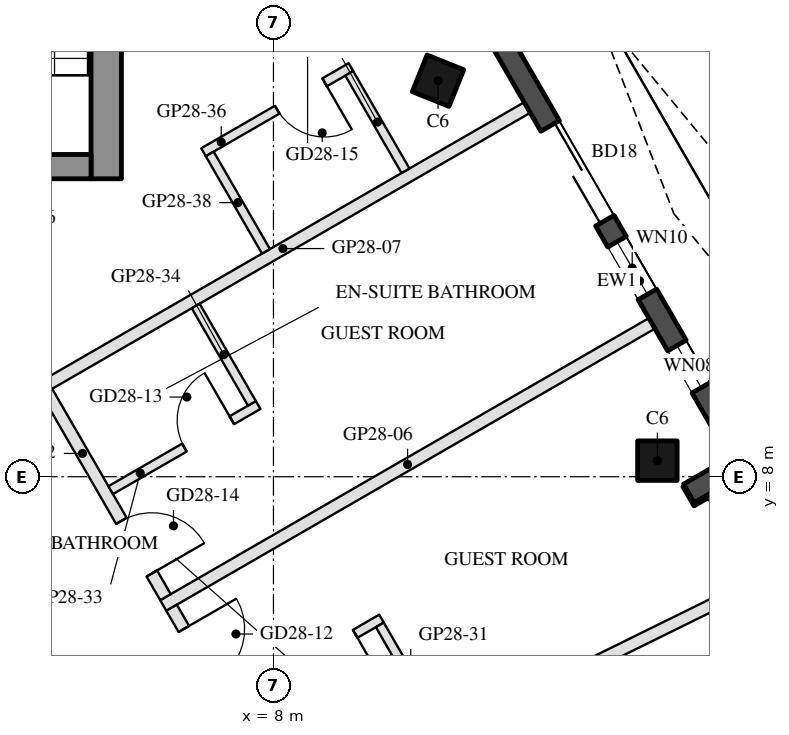
"""IFC4 building model, lengths in metres.
Left out: names, types, materials, properties, quantities, classifications, styles, units other than length and angle.
Written with IfcOpenShell. Run it as: python <this file> out.ifc"""

import sys

from ifc_helpers import new_model, si_unit, direction, frame, frame_2d, origin, origin_2d, place, context, subcontext, project, spatial, rectangle, hollow_rectangle, extrude, boolean, halfspace, element, fill, save


model = new_model("IFC4")
c1 = context("Model", 3, precision=1e-05, world=origin(), true_north=direction((0.0, 1.0)))
c2 = subcontext(c1, "Body", "Model", "MODEL_VIEW")
j1 = project(units=[si_unit("LENGTHUNIT", "METRE"), si_unit("PLANEANGLEUNIT", "RADIAN")], contexts=[c1])
p1 = place(None, origin())
s1 = spatial("IfcSite", under=j1, at=p1, CompositionType="ELEMENT")
p2 = place(p1, origin())
s2 = spatial("IfcBuilding", under=s1, at=p2, CompositionType="ELEMENT")
p3 = place(p2, frame((0.0, 0.0, 287.4)))
s3 = spatial("IfcBuildingStorey", under=s2, at=p3, CompositionType="ELEMENT", Elevation=287.4)
p4 = place(p3, frame((14.314, 8.264, 0.0), z_axis=(-0.13115563542, -0.07578460883, 0.988460870425), x_axis=(-0.500216662803, 0.86590027717, 1.5862574e-05)))
e1 = element("IfcColumn", 1, at=p4, inside=s3, PredefinedType="COLUMN", context=c2, shape_type="SweptSolid", body=[
    boolean("DIFFERENCE", boolean("DIFFERENCE", extrude(hollow_rectangle(XDim=0.65, YDim=0.65, WallThickness=0.03, at=origin_2d()), origin(), (0.0, 0.0, 1.0), 3.743), halfspace(frame((0.0, 0.0, 0.037), z_axis=(0.0, 0.0, 1.0), x_axis=(1.0, 0.0, 0.0)), True)), halfspace(frame((0.0, 0.0, 3.706), z_axis=(0.0, 0.0, 1.0), x_axis=(1.0, 0.0, 0.0)), False)),
])
p5 = place(p3, frame((10.707, 14.513, 0.0), z_axis=(-0.100511564979, -0.128308480942, 0.986627771261), x_axis=(-0.503128985572, 0.862066140583, 0.060853867073)))
e2 = element("IfcColumn", 2, at=p5, inside=s3, PredefinedType="COLUMN", context=c2, shape_type="SweptSolid", body=[
    boolean("DIFFERENCE", boolean("DIFFERENCE", extrude(hollow_rectangle(XDim=0.65, YDim=0.65, WallThickness=0.03, at=origin_2d()), origin(), (0.0, 0.0, 1.0), 3.75), halfspace(frame((0.0, 0.0, 0.04), z_axis=(0.0, 0.0, 1.0), x_axis=(1.0, 0.0, 0.0)), True)), halfspace(frame((0.0, 0.0, 3.711), z_axis=(0.0, 0.0, 1.0), x_axis=(1.0, 0.0, 0.0)), False)),
])
p6 = place(p3, frame((17.913, 2.68, 0.0), z_axis=(0.0, 0.0, 1.0), x_axis=(-0.499985371027, 0.866033849661, 0.0)))
e3 = element("IfcWall", 3, at=p6, inside=s3, PredefinedType="SOLIDWALL", context=c2, shape_type="SweptSolid", body=[
    extrude(rectangle(XDim=6.055, YDim=0.35, at=frame_2d((3.028, 0.0))), origin(), (0.0, 0.0, 1.0), 3.55),
])
p7 = place(p6, frame((4.59, 0.0, 0.0)))
e4 = element("IfcOpeningElement", 4, at=p7, cuts=e3, PredefinedType="OPENING", context=c2, shape_type="SweptSolid", body=[
    extrude(rectangle(XDim=1.1, YDim=2.4, at=frame_2d((0.55, 1.2))), frame((0.0, 0.185, 0.0), z_axis=(0.0, -1.0, 0.0), x_axis=(1.0, 0.0, 0.0)), (0.0, 0.0, 1.0), 0.37),
])
p8 = place(p3, frame((14.833, 7.727, 0.0), z_axis=(0.0, 0.0, 1.0), x_axis=(0.866142280446, 0.499797509021, 0.0)))
e5 = element("IfcWall", 5, at=p8, inside=s3, PredefinedType="SOLIDWALL", context=c2, shape_type="SweptSolid", body=[
    extrude(rectangle(XDim=1.22, YDim=0.35, at=frame_2d((0.61, 0.0))), origin(), (0.0, 0.0, 1.0), 3.55),
])
p9 = place(p3, frame((15.825, 8.097, 0.0), z_axis=(0.0, 0.0, 1.0), x_axis=(-0.500006872736, 0.866021435772, 0.0)))
e6 = element("IfcWall", 6, at=p9, inside=s3, PredefinedType="SOLIDWALL", context=c2, shape_type="SweptSolid", body=[
    extrude(rectangle(XDim=9.015, YDim=0.35, at=frame_2d((4.508, 0.0))), origin(), (0.0, 0.0, 1.0), 3.55),
])
p10 = place(p9, frame((1.579, 0.0, 0.3)))
e7 = element("IfcOpeningElement", 7, at=p10, cuts=e6, PredefinedType="OPENING", context=c2, shape_type="SweptSolid", body=[
    extrude(rectangle(XDim=0.8, YDim=2.65, at=frame_2d((0.4, 1.325))), frame((0.0, 0.185, 0.0), z_axis=(0.0, -1.0, 0.0), x_axis=(1.0, 0.0, 0.0)), (0.0, 0.0, 1.0), 0.37),
])
p11 = place(p9, frame((4.75, 0.0, 0.0)))
e8 = element("IfcOpeningElement", 8, at=p11, cuts=e6, PredefinedType="OPENING", context=c2, shape_type="SweptSolid", body=[
    extrude(rectangle(XDim=1.8, YDim=2.4, at=frame_2d((0.9, 1.2))), frame((0.0, 0.185, 0.0), z_axis=(0.0, -1.0, 0.0), x_axis=(1.0, 0.0, 0.0)), (0.0, 0.0, 1.0), 0.37),
])
p12 = place(p9, frame((3.35, 0.0, 0.3)))
e9 = element("IfcOpeningElement", 9, at=p12, cuts=e6, PredefinedType="OPENING", context=c2, shape_type="SweptSolid", body=[
    extrude(rectangle(XDim=1.0, YDim=2.65, at=frame_2d((0.5, 1.325))), frame((0.0, 0.185, 0.0), z_axis=(0.0, -1.0, 0.0), x_axis=(1.0, 0.0, 0.0)), (0.0, 0.0, 1.0), 0.37),
])
p13 = place(p3, frame((5.25, 12.9, 0.0), z_axis=(0.0, 0.0, 1.0), x_axis=(0.0, 1.0, 0.0)))
e10 = element("IfcWall", 10, at=p13, inside=s3, PredefinedType="SHEAR", context=c2, shape_type="SweptSolid", body=[
    extrude(rectangle(XDim=12.129, YDim=0.5, at=frame_2d((6.064, 0.0))), origin(), (0.0, 0.0, 1.0), 3.5),
])
p14 = place(p3, frame((5.0, 13.1, 0.0), z_axis=(0.0, 0.0, 1.0), x_axis=(-1.0, 0.0, 0.0)))
e11 = element("IfcWall", 11, at=p14, inside=s3, PredefinedType="SHEAR", context=c2, shape_type="SweptSolid", body=[
    extrude(rectangle(XDim=10.0, YDim=0.4, at=frame_2d((5.0, 0.0))), origin(), (0.0, 0.0, 1.0), 3.5),
])
p15 = place(p14, frame((3.55, 0.0, 0.0)))
e12 = element("IfcOpeningElement", 12, at=p15, cuts=e11, PredefinedType="OPENING", context=c2, shape_type="SweptSolid", body=[
    extrude(rectangle(XDim=1.1, YDim=2.1, at=frame_2d((0.55, 1.05))), frame((0.0, 0.21, 0.0), z_axis=(0.0, -1.0, 0.0), x_axis=(1.0, 0.0, 0.0)), (0.0, 0.0, 1.0), 0.42),
])
p16 = place(p14, frame((5.85, 0.0, 0.0)))
e13 = element("IfcOpeningElement", 13, at=p16, cuts=e11, PredefinedType="OPENING", context=c2, shape_type="SweptSolid", body=[
    extrude(rectangle(XDim=1.4, YDim=2.1, at=frame_2d((0.7, 1.05))), frame((0.0, 0.21, 0.0), z_axis=(0.0, -1.0, 0.0), x_axis=(1.0, 0.0, 0.0)), (0.0, 0.0, 1.0), 0.42),
])
p17 = place(p3, frame((15.715, 6.139, 0.0), z_axis=(0.0, 0.0, 1.0), x_axis=(-0.897120508699, -0.44178591294, 0.0)))
e14 = element("IfcWall", 14, at=p17, inside=s3, PredefinedType="PARTITIONING", context=c2, shape_type="SweptSolid", body=[
    extrude(rectangle(XDim=8.397, YDim=0.2, at=frame_2d((4.198, 0.0))), origin(), (0.0, 0.0, 1.0), 3.1),
])
p18 = place(p3, frame((14.224, 10.521, 0.0), z_axis=(0.0, 0.0, 1.0), x_axis=(-0.866024341471, -0.500001839976, 0.0)))
e15 = element("IfcWall", 15, at=p18, inside=s3, PredefinedType="PARTITIONING", context=c2, shape_type="SweptSolid", body=[
    extrude(rectangle(XDim=9.279, YDim=0.2, at=frame_2d((4.639, 0.0))), origin(), (0.0, 0.0, 1.0), 3.1),
])
p19 = place(p3, frame((12.174, 14.072, 0.0), z_axis=(0.0, 0.0, 1.0), x_axis=(-0.866035734738, -0.499982105836, 0.0)))
e16 = element("IfcWall", 16, at=p19, inside=s3, PredefinedType="PARTITIONING", context=c2, shape_type="SweptSolid", body=[
    extrude(rectangle(XDim=9.279, YDim=0.2, at=frame_2d((4.639, 0.0))), origin(), (0.0, 0.0, 1.0), 3.1),
])
p20 = place(p3, frame((16.33, 5.074, 0.0), z_axis=(0.0, 0.0, 1.0), x_axis=(-0.848469139967, -0.52924485687, 0.0)))
e17 = element("IfcWall", 17, at=p20, inside=s3, PredefinedType="PARTITIONING", context=c2, shape_type="SweptSolid", body=[
    extrude(rectangle(XDim=8.384, YDim=0.15, at=frame_2d((4.192, 0.0))), origin(), (0.0, 0.0, 1.0), 3.1),
])
p21 = place(p3, frame((6.325, 5.845, 0.0), z_axis=(0.0, 0.0, 1.0), x_axis=(0.499988034227, -0.866032312117, 0.0)))
e18 = element("IfcWall", 18, at=p21, inside=s3, PredefinedType="PARTITIONING", context=c2, shape_type="SweptSolid", body=[
    extrude(rectangle(XDim=3.793, YDim=0.2, at=frame_2d((1.896, 0.0))), origin(), (0.0, 0.0, 1.0), 3.05),
])
p22 = place(p21, frame((0.403, 0.0, 0.0)))
e19 = element("IfcOpeningElement", 19, at=p22, cuts=e18, PredefinedType="OPENING", context=c2, shape_type="SweptSolid", body=[
    extrude(rectangle(XDim=1.0, YDim=2.1, at=frame_2d((0.5, 1.05))), frame((0.0, 0.11, 0.0), z_axis=(0.0, -1.0, 0.0), x_axis=(1.0, 0.0, 0.0)), (0.0, 0.0, 1.0), 0.22),
])
p23 = place(p3, frame((9.777, 5.666, 0.0), z_axis=(0.0, 0.0, 1.0), x_axis=(-0.865996816683, -0.500049511043, 0.0)))
e20 = element("IfcWall", 20, at=p23, inside=s3, PredefinedType="PARTITIONING", context=c2, shape_type="SweptSolid", body=[
    extrude(rectangle(XDim=2.8, YDim=0.15, at=frame_2d((1.4, 0.0))), origin(), (0.0, 0.0, 1.0), 3.05),
])
p24 = place(p23, frame((0.5, 0.0, 0.0)))
e21 = element("IfcOpeningElement", 21, at=p24, cuts=e20, PredefinedType="OPENING", context=c2, shape_type="SweptSolid", body=[
    extrude(rectangle(XDim=0.9, YDim=2.1, at=frame_2d((0.45, 1.05))), frame((0.0, 0.085, 0.0), z_axis=(0.0, -1.0, 0.0), x_axis=(1.0, 0.0, 0.0)), (0.0, 0.0, 1.0), 0.17),
])
p25 = place(p3, frame((10.761, 3.811, 0.0), z_axis=(0.0, 0.0, 1.0), x_axis=(-0.499941815747, 0.866058993873, 0.0)))
e22 = element("IfcWall", 22, at=p25, inside=s3, PredefinedType="PARTITIONING", context=c2, shape_type="SweptSolid", body=[
    extrude(rectangle(XDim=2.023, YDim=0.15, at=frame_2d((1.012, 0.0))), origin(), (0.0, 0.0, 1.0), 3.05),
])
p26 = place(p3, frame((4.275, 9.396, 0.0), z_axis=(0.0, 0.0, 1.0), x_axis=(0.499997012787, -0.866027128446, 0.0)))
e23 = element("IfcWall", 23, at=p26, inside=s3, PredefinedType="PARTITIONING", context=c2, shape_type="SweptSolid", body=[
    extrude(rectangle(XDim=3.9, YDim=0.2, at=frame_2d((1.95, 0.0))), origin(), (0.0, 0.0, 1.0), 3.05),
])
p27 = place(p26, frame((2.45, 0.0, 0.0)))
e24 = element("IfcOpeningElement", 24, at=p27, cuts=e23, PredefinedType="OPENING", context=c2, shape_type="SweptSolid", body=[
    extrude(rectangle(XDim=1.0, YDim=2.1, at=frame_2d((0.5, 1.05))), frame((0.0, 0.11, 0.0), z_axis=(0.0, -1.0, 0.0), x_axis=(1.0, 0.0, 0.0)), (0.0, 0.0, 1.0), 0.22),
])
p28 = place(p3, frame((5.324, 7.779, 0.0), z_axis=(0.0, 0.0, 1.0), x_axis=(0.865996816683, 0.500049511043, 0.0)))
e25 = element("IfcWall", 25, at=p28, inside=s3, PredefinedType="PARTITIONING", context=c2, shape_type="SweptSolid", body=[
    extrude(rectangle(XDim=2.8, YDim=0.15, at=frame_2d((1.4, 0.0))), origin(), (0.0, 0.0, 1.0), 3.55),
])
p29 = place(p28, frame((1.4, 0.0, 0.0)))
e26 = element("IfcOpeningElement", 26, at=p29, cuts=e25, PredefinedType="OPENING", context=c2, shape_type="SweptSolid", body=[
    extrude(rectangle(XDim=0.9, YDim=2.1, at=frame_2d((0.45, 1.05))), frame((0.0, 0.085, 0.0), z_axis=(0.0, -1.0, 0.0), x_axis=(1.0, 0.0, 0.0)), (0.0, 0.0, 1.0), 0.17),
])
p30 = place(p3, frame((7.646, 9.207, 0.0), z_axis=(0.0, 0.0, 1.0), x_axis=(-0.49994333299, 0.866058118026, 0.0)))
e27 = element("IfcWall", 27, at=p30, inside=s3, PredefinedType="PARTITIONING", context=c2, shape_type="SweptSolid", body=[
    extrude(rectangle(XDim=1.85, YDim=0.15, at=frame_2d((0.925, 0.0))), origin(), (0.0, 0.0, 1.0), 3.55),
])
p31 = place(p3, frame((9.274, 14.737, 0.0), z_axis=(0.0, 0.0, 1.0), x_axis=(-0.866018616679, -0.500011755427, 0.0)))
e28 = element("IfcWall", 28, at=p31, inside=s3, PredefinedType="PARTITIONING", context=c2, shape_type="SweptSolid", body=[
    extrude(rectangle(XDim=2.8, YDim=0.15, at=frame_2d((1.4, 0.0))), origin(), (0.0, 0.0, 1.0), 3.1),
])
p32 = place(p31, frame((0.5, 0.0, 0.0)))
e29 = element("IfcOpeningElement", 29, at=p32, cuts=e28, PredefinedType="OPENING", context=c2, shape_type="SweptSolid", body=[
    extrude(rectangle(XDim=0.9, YDim=2.1, at=frame_2d((0.45, 1.05))), frame((0.0, 0.085, 0.0), z_axis=(0.0, -1.0, 0.0), x_axis=(1.0, 0.0, 0.0)), (0.0, 0.0, 1.0), 0.17),
])
p33 = place(p3, frame((10.172, 13.032, 0.0), z_axis=(0.0, 0.0, 1.0), x_axis=(-0.500042316284, 0.866000971088, 0.0)))
e30 = element("IfcWall", 30, at=p33, inside=s3, PredefinedType="PARTITIONING", context=c2, shape_type="SweptSolid", body=[
    extrude(rectangle(XDim=1.85, YDim=0.15, at=frame_2d((0.925, 0.0))), origin(), (0.0, 0.0, 1.0), 3.05),
])
p34 = place(p3, frame((7.877, 11.707, 0.0), z_axis=(0.0, 0.0, 1.0), x_axis=(-0.499985172903, 0.866033964044, 0.0)))
e31 = element("IfcWall", 31, at=p34, inside=s3, PredefinedType="PARTITIONING", context=c2, shape_type="SweptSolid", body=[
    extrude(rectangle(XDim=1.85, YDim=0.15, at=frame_2d((0.925, 0.0))), origin(), (0.0, 0.0, 1.0), 3.05),
])
p35 = place(p7, frame((1.1, 0.0, 0.0), z_axis=(0.0, 0.0, 1.0), x_axis=(-1.0, 0.0, 0.0)))
e32 = element("IfcDoor", 32, at=p35, inside=s3, OperationType="SLIDING_TO_LEFT", PredefinedType="DOOR", context=c2, shape_type="SweptSolid", body=[
    extrude(rectangle(XDim=1.1, YDim=2.4, at=frame_2d((0.55, 1.2))), frame((0.0, 0.025, 0.0), z_axis=(0.0, -1.0, 0.0), x_axis=(1.0, 0.0, 0.0)), (0.0, 0.0, 1.0), 0.05),
])
fill(e4, e32)
p36 = place(p10, origin())
e33 = element("IfcWindow", 33, at=p36, inside=s3, PartitioningType="SINGLE_PANEL", PredefinedType="WINDOW", context=c2, shape_type="SweptSolid", body=[
    extrude(rectangle(XDim=0.8, YDim=2.65, at=frame_2d((0.4, 1.325))), frame((0.0, 0.03, 0.0), z_axis=(0.0, -1.0, 0.0), x_axis=(1.0, 0.0, 0.0)), (0.0, 0.0, 1.0), 0.06),
])
fill(e7, e33)
p37 = place(p11, frame((1.8, 0.0, 0.0), z_axis=(0.0, 0.0, 1.0), x_axis=(-1.0, 0.0, 0.0)))
e34 = element("IfcDoor", 34, at=p37, inside=s3, OperationType="SLIDING_TO_LEFT", PredefinedType="DOOR", context=c2, shape_type="SweptSolid", body=[
    extrude(rectangle(XDim=1.8, YDim=2.4, at=frame_2d((0.9, 1.2))), frame((0.0, 0.025, 0.0), z_axis=(0.0, -1.0, 0.0), x_axis=(1.0, 0.0, 0.0)), (0.0, 0.0, 1.0), 0.05),
])
fill(e8, e34)
p38 = place(p12, origin())
e35 = element("IfcWindow", 35, at=p38, inside=s3, PartitioningType="SINGLE_PANEL", PredefinedType="WINDOW", context=c2, shape_type="SweptSolid", body=[
    extrude(rectangle(XDim=1.0, YDim=2.65, at=frame_2d((0.5, 1.325))), frame((0.0, 0.03, 0.0), z_axis=(0.0, -1.0, 0.0), x_axis=(1.0, 0.0, 0.0)), (0.0, 0.0, 1.0), 0.06),
])
fill(e9, e35)
p39 = place(p24, origin())
e36 = element("IfcDoor", 36, at=p39, inside=s3, OperationType="SINGLE_SWING_LEFT", PredefinedType="DOOR", context=c2, shape_type="SweptSolid", body=[
    extrude(rectangle(XDim=0.9, YDim=2.1, at=frame_2d((0.45, 1.05))), frame((0.0, 0.025, 0.0), z_axis=(0.0, -1.0, 0.0), x_axis=(1.0, 0.0, 0.0)), (0.0, 0.0, 1.0), 0.05),
])
fill(e21, e36)
p40 = place(p22, origin())
e37 = element("IfcDoor", 37, at=p40, inside=s3, OperationType="SINGLE_SWING_LEFT", PredefinedType="DOOR", context=c2, shape_type="SweptSolid", body=[
    extrude(rectangle(XDim=1.0, YDim=2.1, at=frame_2d((0.5, 1.05))), frame((0.0, 0.025, 0.0), z_axis=(0.0, -1.0, 0.0), x_axis=(1.0, 0.0, 0.0)), (0.0, 0.0, 1.0), 0.05),
])
fill(e19, e37)
p41 = place(p29, origin())
e38 = element("IfcDoor", 38, at=p41, inside=s3, OperationType="SINGLE_SWING_RIGHT", PredefinedType="DOOR", context=c2, shape_type="SweptSolid", body=[
    extrude(rectangle(XDim=0.9, YDim=2.1, at=frame_2d((0.45, 1.05))), frame((0.0, 0.025, 0.0), z_axis=(0.0, -1.0, 0.0), x_axis=(1.0, 0.0, 0.0)), (0.0, 0.0, 1.0), 0.05),
])
fill(e26, e38)
p42 = place(p27, origin())
e39 = element("IfcDoor", 39, at=p42, inside=s3, OperationType="SINGLE_SWING_RIGHT", PredefinedType="DOOR", context=c2, shape_type="SweptSolid", body=[
    extrude(rectangle(XDim=1.0, YDim=2.1, at=frame_2d((0.5, 1.05))), frame((0.0, 0.025, 0.0), z_axis=(0.0, -1.0, 0.0), x_axis=(1.0, 0.0, 0.0)), (0.0, 0.0, 1.0), 0.05),
])
fill(e24, e39)
p43 = place(p32, origin())
e40 = element("IfcDoor", 40, at=p43, inside=s3, OperationType="SINGLE_SWING_LEFT", PredefinedType="DOOR", context=c2, shape_type="SweptSolid", body=[
    extrude(rectangle(XDim=0.9, YDim=2.1, at=frame_2d((0.45, 1.05))), frame((0.0, 0.025, 0.0), z_axis=(0.0, -1.0, 0.0), x_axis=(1.0, 0.0, 0.0)), (0.0, 0.0, 1.0), 0.05),
])
fill(e29, e40)
save(model, sys.argv[1])
